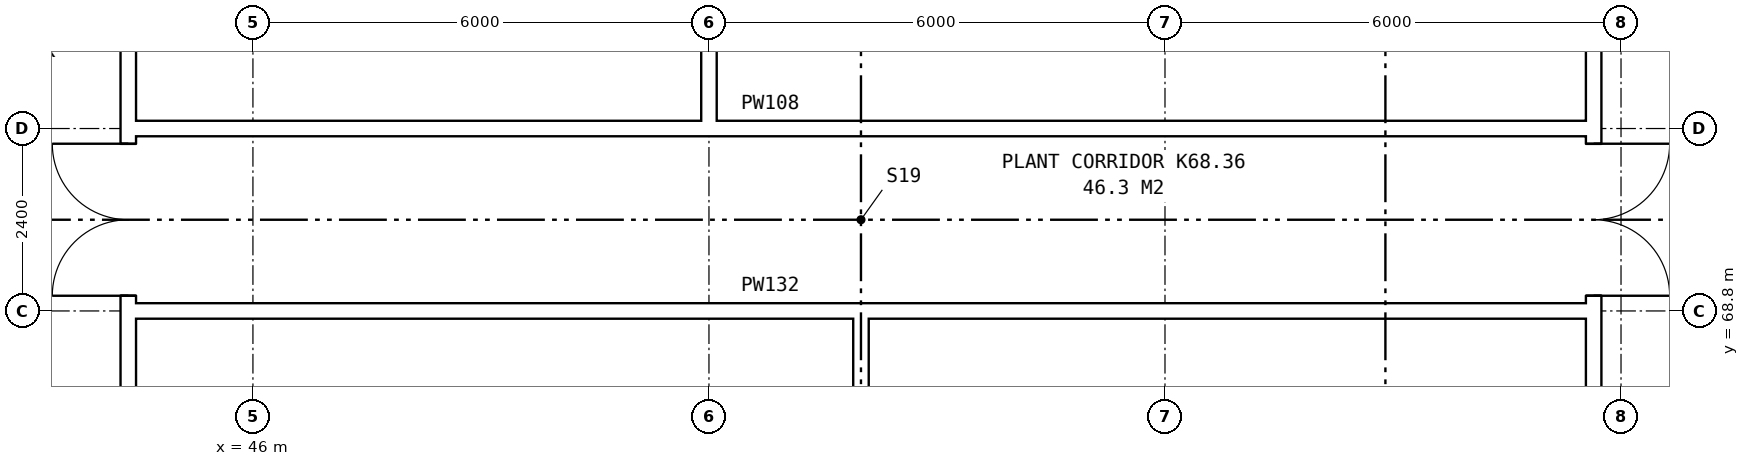
"""IFC4 building model, lengths in metres.
Left out: names, types, materials, properties, quantities, classifications, styles, units other than length and angle.
Written with IfcOpenShell. Run it as: python <this file> out.ifc"""

import sys

from ifc_helpers import new_model, si_unit, direction, frame, frame_2d, origin, place, context, subcontext, project, spatial, rectangle, extrude, element, fill, save


model = new_model("IFC4")
c1 = context("Model", 3, precision=1e-05, world=origin(), true_north=direction((0.0, 1.0)))
c2 = subcontext(c1, "Body", "Model", "MODEL_VIEW")
j1 = project(units=[si_unit("LENGTHUNIT", "METRE"), si_unit("PLANEANGLEUNIT", "RADIAN")], contexts=[c1])
p1 = place(None, origin())
s1 = spatial("IfcSite", under=j1, at=p1, CompositionType="ELEMENT")
p2 = place(p1, origin())
s2 = spatial("IfcBuilding", under=s1, at=p2, CompositionType="ELEMENT")
p3 = place(p2, frame((0.0, 0.0, 243.9)))
s3 = spatial("IfcBuildingStorey", under=s2, at=p3, CompositionType="ELEMENT", Elevation=243.9)
p4 = place(p3, frame((63.64, 63.9, 0.0), z_axis=(0.0, 0.0, 1.0), x_axis=(0.0, 1.0, 0.0)))
e1 = element("IfcWall", 1, at=p4, inside=s3, PredefinedType="PARTITIONING", context=c2, shape_type="SweptSolid", body=[
    extrude(rectangle(XDim=12.2, YDim=0.2, at=frame_2d((6.1, 0.0))), origin(), (0.0, 0.0, 1.0), 3.3),
])
p5 = place(p4, frame((5.1, 0.0, 0.0)))
e2 = element("IfcOpeningElement", 2, at=p5, cuts=e1, PredefinedType="OPENING", context=c2, shape_type="SweptSolid", body=[
    extrude(rectangle(XDim=2.0, YDim=2.1, at=frame_2d((1.0, 1.05))), frame((0.0, 0.11, 0.0), z_axis=(0.0, -1.0, 0.0), x_axis=(1.0, 0.0, 0.0)), (0.0, 0.0, 1.0), 0.22),
])
p6 = place(p3, frame((44.36, 63.9, 0.0), z_axis=(0.0, 0.0, 1.0), x_axis=(0.0, 1.0, 0.0)))
e3 = element("IfcWall", 3, at=p6, inside=s3, PredefinedType="PARTITIONING", context=c2, shape_type="SweptSolid", body=[
    extrude(rectangle(XDim=12.2, YDim=0.2, at=frame_2d((6.1, 0.0))), origin(), (0.0, 0.0, 1.0), 3.3),
])
p7 = place(p6, frame((5.1, 0.0, 0.0)))
e4 = element("IfcOpeningElement", 4, at=p7, cuts=e3, PredefinedType="OPENING", context=c2, shape_type="SweptSolid", body=[
    extrude(rectangle(XDim=2.0, YDim=2.1, at=frame_2d((1.0, 1.05))), frame((0.0, 0.11, 0.0), z_axis=(0.0, -1.0, 0.0), x_axis=(1.0, 0.0, 0.0)), (0.0, 0.0, 1.0), 0.22),
])
for number, where, z_axis, x_axis in (
    (5, (44.36, 68.8, 0.0), (0.0, 0.0, 1.0), (1.0, 0.0, 0.0)),
    (6, (44.36, 71.2, 0.0), (0.0, 0.0, 1.0), (1.0, 0.0, 0.0)),
):
    element("IfcWall", number, at=place(p3, frame(where, z_axis=z_axis, x_axis=x_axis)), inside=s3, PredefinedType="PARTITIONING", context=c2, shape_type="SweptSolid", body=[
        extrude(rectangle(XDim=19.28, YDim=0.2, at=frame_2d((9.64, 0.0))), origin(), (0.0, 0.0, 1.0), 3.3),
    ])
for number, where, z_axis, x_axis in (
    (7, (52.0, 71.1, 0.0), (0.0, 0.0, 1.0), (0.0, 1.0, 0.0)),
    (8, (54.0, 63.7, 0.0), (0.0, 0.0, 1.0), (0.0, 1.0, 0.0)),
):
    element("IfcWall", number, at=place(p3, frame(where, z_axis=z_axis, x_axis=x_axis)), inside=s3, PredefinedType="PARTITIONING", context=c2, shape_type="SweptSolid", body=[
        extrude(rectangle(XDim=5.2, YDim=0.2, at=frame_2d((2.6, 0.0))), origin(), (0.0, 0.0, 1.0), 3.3),
    ])
p8 = place(p5, frame((2.0, 0.0, 0.0), z_axis=(0.0, 0.0, 1.0), x_axis=(-1.0, 0.0, 0.0)))
e9 = element("IfcDoor", 9, at=p8, inside=s3, OperationType="DOUBLE_DOOR_SINGLE_SWING", PredefinedType="DOOR", context=c2, shape_type="SweptSolid", body=[
    extrude(rectangle(XDim=2.0, YDim=2.1, at=frame_2d((1.0, 1.05))), frame((0.0, 0.025, 0.0), z_axis=(0.0, -1.0, 0.0), x_axis=(1.0, 0.0, 0.0)), (0.0, 0.0, 1.0), 0.05),
])
fill(e2, e9)
p9 = place(p7, origin())
e10 = element("IfcDoor", 10, at=p9, inside=s3, OperationType="DOUBLE_DOOR_SINGLE_SWING", PredefinedType="DOOR", context=c2, shape_type="SweptSolid", body=[
    extrude(rectangle(XDim=2.0, YDim=2.1, at=frame_2d((1.0, 1.05))), frame((0.0, 0.025, 0.0), z_axis=(0.0, -1.0, 0.0), x_axis=(1.0, 0.0, 0.0)), (0.0, 0.0, 1.0), 0.05),
])
fill(e4, e10)
save(model, sys.argv[1])
